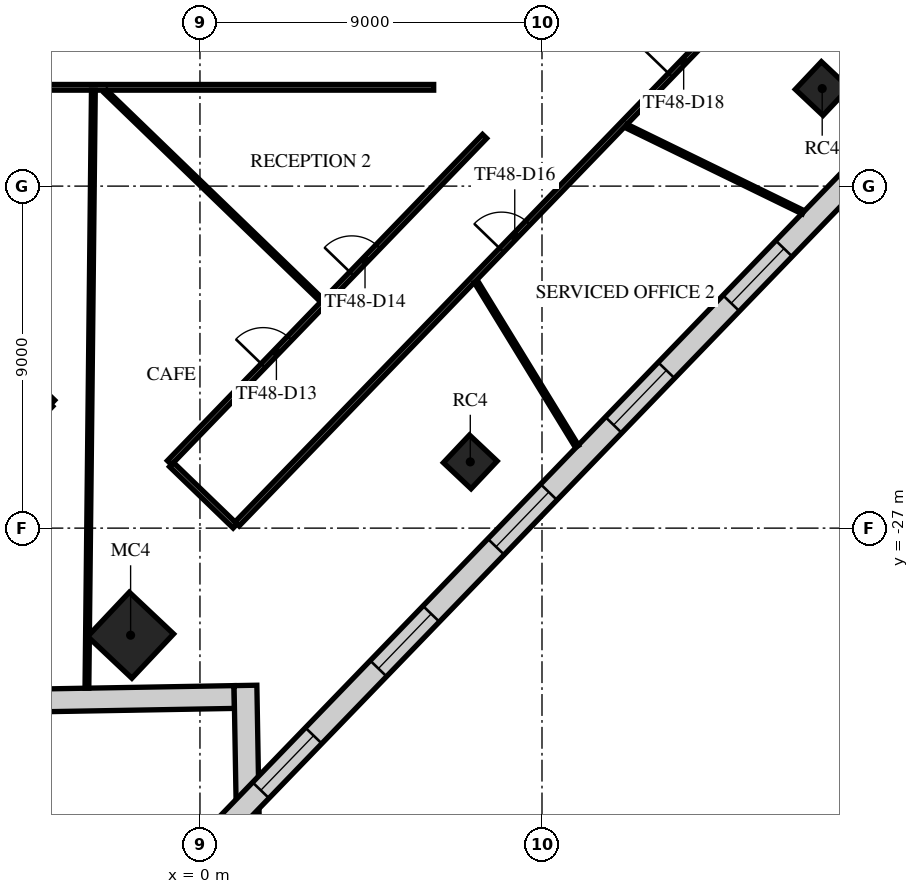
"""IFC4 building model, lengths in metres.
Left out: names, types, materials, properties, quantities, classifications, styles, units other than length and angle.
Written with IfcOpenShell. Run it as: python <this file> out.ifc"""

import sys

from ifc_helpers import new_model, si_unit, direction, frame, frame_2d, origin, origin_2d, place, context, subcontext, project, spatial, rectangle, extrude, element, fill, save


model = new_model("IFC4")
c1 = context("Model", 3, precision=1e-05, world=origin(), true_north=direction((0.0, 1.0)))
c2 = subcontext(c1, "Body", "Model", "MODEL_VIEW")
j1 = project(units=[si_unit("LENGTHUNIT", "METRE"), si_unit("PLANEANGLEUNIT", "RADIAN")], contexts=[c1])
p1 = place(None, origin())
s1 = spatial("IfcSite", under=j1, at=p1, CompositionType="ELEMENT")
p2 = place(p1, origin())
s2 = spatial("IfcBuilding", under=s1, at=p2, CompositionType="ELEMENT")
p3 = place(p2, frame((0.0, 0.0, 205.3)))
s3 = spatial("IfcBuildingStorey", under=s2, at=p3, CompositionType="ELEMENT", Elevation=205.3)
p4 = place(p3, frame((-1.825, -29.818, 0.0), z_axis=(0.0, 0.0, 1.0), x_axis=(0.685916152371, 0.727680583715, 0.0)))
e1 = element("IfcColumn", 1, at=p4, inside=s3, PredefinedType="COLUMN", context=c2, shape_type="SweptSolid", body=[
    extrude(rectangle(XDim=1.6, YDim=1.6, at=origin_2d()), origin(), (0.0, 0.0, 1.0), 4.0),
])
for number, where, z_axis, x_axis in (
    (2, (7.113, -25.257, 0.0), (0.0, 0.0, 1.0), (0.686, 0.728, 0.0)),
    (3, (16.373, -15.433, 0.0), (0.0, 0.0, 1.0), (0.686, 0.728, 0.0)),
):
    element("IfcColumn", number, at=place(p3, frame(where, z_axis=z_axis, x_axis=x_axis)), inside=s3, PredefinedType="COLUMN", context=c2, shape_type="SweptSolid", body=[
        extrude(rectangle(XDim=1.0, YDim=1.0, at=origin_2d()), origin(), (0.0, 0.0, 1.0), 4.0),
    ])
p5 = place(p3, frame((-6.875, -31.58, 0.0), z_axis=(0.0, 0.0, 1.0), x_axis=(0.999847712186, 0.017451430795, 0.0)))
e4 = element("IfcWall", 4, at=p5, inside=s3, PredefinedType="STANDARD", context=c2, shape_type="SweptSolid", body=[
    extrude(rectangle(XDim=7.778, YDim=0.6, at=frame_2d((3.889, 0.0))), origin(), (0.0, 0.0, 1.0), 3.62),
])
p6 = place(p5, frame((1.244, 0.0, 0.9)))
e5 = element("IfcOpeningElement", 5, at=p6, cuts=e4, PredefinedType="OPENING", context=c2, shape_type="SweptSolid", body=[
    extrude(rectangle(XDim=1.4, YDim=2.1, at=frame_2d((0.7, 1.05))), frame((0.0, 0.31, 0.0), z_axis=(0.0, -1.0, 0.0), x_axis=(1.0, 0.0, 0.0)), (0.0, 0.0, 1.0), 0.62),
])
p7 = place(p3, frame((1.197, -31.139, 0.0), z_axis=(0.0, 0.0, 1.0), x_axis=(0.017454332947, -0.999847661527, 0.0)))
e6 = element("IfcWall", 6, at=p7, inside=s3, PredefinedType="STANDARD", context=c2, shape_type="SweptSolid", body=[
    extrude(rectangle(XDim=3.846, YDim=0.6, at=frame_2d((1.923, 0.0))), origin(), (0.0, 0.0, 1.0), 3.62),
])
p8 = place(p3, frame((0.749, -34.782, 0.0), z_axis=(0.0, 0.0, 1.0), x_axis=(0.694657553534, 0.719340589233, 0.0)))
e7 = element("IfcWall", 7, at=p8, inside=s3, PredefinedType="STANDARD", context=c2, shape_type="SweptSolid", body=[
    extrude(rectangle(XDim=49.0, YDim=0.6, at=frame_2d((24.5, 0.0))), origin(), (0.0, 0.0, 1.0), 3.62),
])
p9 = place(p8, frame((1.227, 0.0, 0.9)))
e8 = element("IfcOpeningElement", 8, at=p9, cuts=e7, PredefinedType="OPENING", context=c2, shape_type="SweptSolid", body=[
    extrude(rectangle(XDim=2.0, YDim=2.1, at=frame_2d((1.0, 1.05))), frame((0.0, 0.31, 0.0), z_axis=(0.0, -1.0, 0.0), x_axis=(1.0, 0.0, 0.0)), (0.0, 0.0, 1.0), 0.62),
])
p10 = place(p8, frame((5.682, 0.0, 0.9)))
e9 = element("IfcOpeningElement", 9, at=p10, cuts=e7, PredefinedType="OPENING", context=c2, shape_type="SweptSolid", body=[
    extrude(rectangle(XDim=2.0, YDim=2.1, at=frame_2d((1.0, 1.05))), frame((0.0, 0.31, 0.0), z_axis=(0.0, -1.0, 0.0), x_axis=(1.0, 0.0, 0.0)), (0.0, 0.0, 1.0), 0.62),
])
p11 = place(p8, frame((10.136, 0.0, 0.9)))
e10 = element("IfcOpeningElement", 10, at=p11, cuts=e7, PredefinedType="OPENING", context=c2, shape_type="SweptSolid", body=[
    extrude(rectangle(XDim=2.0, YDim=2.1, at=frame_2d((1.0, 1.05))), frame((0.0, 0.31, 0.0), z_axis=(0.0, -1.0, 0.0), x_axis=(1.0, 0.0, 0.0)), (0.0, 0.0, 1.0), 0.62),
])
p12 = place(p8, frame((14.591, 0.0, 0.9)))
e11 = element("IfcOpeningElement", 11, at=p12, cuts=e7, PredefinedType="OPENING", context=c2, shape_type="SweptSolid", body=[
    extrude(rectangle(XDim=2.0, YDim=2.1, at=frame_2d((1.0, 1.05))), frame((0.0, 0.31, 0.0), z_axis=(0.0, -1.0, 0.0), x_axis=(1.0, 0.0, 0.0)), (0.0, 0.0, 1.0), 0.62),
])
p13 = place(p8, frame((19.045, 0.0, 0.9)))
e12 = element("IfcOpeningElement", 12, at=p13, cuts=e7, PredefinedType="OPENING", context=c2, shape_type="SweptSolid", body=[
    extrude(rectangle(XDim=2.0, YDim=2.1, at=frame_2d((1.0, 1.05))), frame((0.0, 0.31, 0.0), z_axis=(0.0, -1.0, 0.0), x_axis=(1.0, 0.0, 0.0)), (0.0, 0.0, 1.0), 0.62),
])
p14 = place(p8, frame((23.5, 0.0, 0.9)))
e13 = element("IfcOpeningElement", 13, at=p14, cuts=e7, PredefinedType="OPENING", context=c2, shape_type="SweptSolid", body=[
    extrude(rectangle(XDim=2.0, YDim=2.1, at=frame_2d((1.0, 1.05))), frame((0.0, 0.31, 0.0), z_axis=(0.0, -1.0, 0.0), x_axis=(1.0, 0.0, 0.0)), (0.0, 0.0, 1.0), 0.62),
])
p15 = place(p8, frame((27.955, 0.0, 0.9)))
e14 = element("IfcOpeningElement", 14, at=p15, cuts=e7, PredefinedType="OPENING", context=c2, shape_type="SweptSolid", body=[
    extrude(rectangle(XDim=2.0, YDim=2.1, at=frame_2d((1.0, 1.05))), frame((0.0, 0.31, 0.0), z_axis=(0.0, -1.0, 0.0), x_axis=(1.0, 0.0, 0.0)), (0.0, 0.0, 1.0), 0.62),
])
p16 = place(p8, frame((32.409, 0.0, 0.9)))
e15 = element("IfcOpeningElement", 15, at=p16, cuts=e7, PredefinedType="OPENING", context=c2, shape_type="SweptSolid", body=[
    extrude(rectangle(XDim=2.0, YDim=2.1, at=frame_2d((1.0, 1.05))), frame((0.0, 0.31, 0.0), z_axis=(0.0, -1.0, 0.0), x_axis=(1.0, 0.0, 0.0)), (0.0, 0.0, 1.0), 0.62),
])
p17 = place(p8, frame((36.864, 0.0, 0.9)))
e16 = element("IfcOpeningElement", 16, at=p17, cuts=e7, PredefinedType="OPENING", context=c2, shape_type="SweptSolid", body=[
    extrude(rectangle(XDim=2.0, YDim=2.1, at=frame_2d((1.0, 1.05))), frame((0.0, 0.31, 0.0), z_axis=(0.0, -1.0, 0.0), x_axis=(1.0, 0.0, 0.0)), (0.0, 0.0, 1.0), 0.62),
])
p18 = place(p8, frame((41.318, 0.0, 0.9)))
e17 = element("IfcOpeningElement", 17, at=p18, cuts=e7, PredefinedType="OPENING", context=c2, shape_type="SweptSolid", body=[
    extrude(rectangle(XDim=2.0, YDim=2.1, at=frame_2d((1.0, 1.05))), frame((0.0, 0.31, 0.0), z_axis=(0.0, -1.0, 0.0), x_axis=(1.0, 0.0, 0.0)), (0.0, 0.0, 1.0), 0.62),
])
p19 = place(p8, frame((45.773, 0.0, 0.9)))
e18 = element("IfcOpeningElement", 18, at=p19, cuts=e7, PredefinedType="OPENING", context=c2, shape_type="SweptSolid", body=[
    extrude(rectangle(XDim=2.0, YDim=2.1, at=frame_2d((1.0, 1.05))), frame((0.0, 0.31, 0.0), z_axis=(0.0, -1.0, 0.0), x_axis=(1.0, 0.0, 0.0)), (0.0, 0.0, 1.0), 0.62),
])
p20 = place(p3, frame((-12.459, -15.4, 0.0), z_axis=(0.0, 0.0, 1.0), x_axis=(0.719357740032, -0.694639792883, 0.0)))
e19 = element("IfcWall", 19, at=p20, inside=s3, PredefinedType="PARTITIONING", context=c2, shape_type="SweptSolid", body=[
    extrude(rectangle(XDim=11.931, YDim=0.15, at=frame_2d((5.966, 0.0))), origin(), (0.0, 0.0, 1.0), 3.17),
])
p21 = place(p3, frame((-12.273, -15.4, 0.0), z_axis=(0.0, 0.0, 1.0), x_axis=(1.0, 0.0, 0.0)))
e20 = element("IfcWall", 20, at=p21, inside=s3, PredefinedType="PARTITIONING", context=c2, shape_type="SweptSolid", body=[
    extrude(rectangle(XDim=18.423, YDim=0.15, at=frame_2d((9.212, 0.0))), origin(), (0.0, 0.0, 1.0), 3.17),
])
p22 = place(p21, frame((6.55, 0.0, 0.0)))
e21 = element("IfcOpeningElement", 21, at=p22, cuts=e20, PredefinedType="OPENING", context=c2, shape_type="SweptSolid", body=[
    extrude(rectangle(XDim=1.0, YDim=2.1, at=frame_2d((0.5, 1.05))), frame((0.0, 0.085, 0.0), z_axis=(0.0, -1.0, 0.0), x_axis=(1.0, 0.0, 0.0)), (0.0, 0.0, 1.0), 0.17),
])
p23 = place(p3, frame((-5.491, -25.36, 0.0), z_axis=(0.0, 0.0, 1.0), x_axis=(0.694737811608, 0.719263076435, 0.0)))
e22 = element("IfcWall", 22, at=p23, inside=s3, PredefinedType="PARTITIONING", context=c2, shape_type="SweptSolid", body=[
    extrude(rectangle(XDim=2.25, YDim=0.15, at=frame_2d((1.125, 0.0))), origin(), (0.0, 0.0, 1.0), 3.17),
])
p24 = place(p3, frame((-0.802, -25.277, 0.0), z_axis=(0.0, 0.0, 1.0), x_axis=(0.69467482151, 0.71932391338, 0.0)))
e23 = element("IfcWall", 23, at=p24, inside=s3, PredefinedType="PARTITIONING", context=c2, shape_type="SweptSolid", body=[
    extrude(rectangle(XDim=11.935, YDim=0.15, at=frame_2d((5.968, 0.0))), origin(), (0.0, 0.0, 1.0), 3.17),
])
p25 = place(p24, frame((3.55, 0.0, 0.0)))
e24 = element("IfcOpeningElement", 24, at=p25, cuts=e23, PredefinedType="OPENING", context=c2, shape_type="SweptSolid", body=[
    extrude(rectangle(XDim=1.0, YDim=2.1, at=frame_2d((0.5, 1.05))), frame((0.0, 0.085, 0.0), z_axis=(0.0, -1.0, 0.0), x_axis=(1.0, 0.0, 0.0)), (0.0, 0.0, 1.0), 0.17),
])
p26 = place(p24, frame((6.906, 0.0, 0.0)))
e25 = element("IfcOpeningElement", 25, at=p26, cuts=e23, PredefinedType="OPENING", context=c2, shape_type="SweptSolid", body=[
    extrude(rectangle(XDim=1.0, YDim=2.1, at=frame_2d((0.5, 1.05))), frame((0.0, 0.085, 0.0), z_axis=(0.0, -1.0, 0.0), x_axis=(1.0, 0.0, 0.0)), (0.0, 0.0, 1.0), 0.17),
])
p27 = place(p3, frame((-0.748, -25.329, 0.0), z_axis=(0.0, 0.0, 1.0), x_axis=(0.719490097839, -0.69450269914, 0.0)))
e26 = element("IfcWall", 26, at=p27, inside=s3, PredefinedType="PARTITIONING", context=c2, shape_type="SweptSolid", body=[
    extrude(rectangle(XDim=2.325, YDim=0.15, at=frame_2d((1.163, 0.0))), origin(), (0.0, 0.0, 1.0), 3.62),
])
p28 = place(p3, frame((0.977, -26.89, 0.0), z_axis=(0.0, 0.0, 1.0), x_axis=(0.694659509326, 0.719338700546, 0.0)))
e27 = element("IfcWall", 27, at=p28, inside=s3, PredefinedType="PARTITIONING", context=c2, shape_type="SweptSolid", body=[
    extrude(rectangle(XDim=37.404, YDim=0.15, at=frame_2d((18.702, 0.0))), origin(), (0.0, 0.0, 1.0), 3.17),
])
p29 = place(p28, frame((10.017, 0.0, 0.0)))
e28 = element("IfcOpeningElement", 28, at=p29, cuts=e27, PredefinedType="OPENING", context=c2, shape_type="SweptSolid", body=[
    extrude(rectangle(XDim=1.0, YDim=2.1, at=frame_2d((0.5, 1.05))), frame((0.0, 0.085, 0.0), z_axis=(0.0, -1.0, 0.0), x_axis=(1.0, 0.0, 0.0)), (0.0, 0.0, 1.0), 0.17),
])
p30 = place(p28, frame((16.416, 0.0, 0.0)))
e29 = element("IfcOpeningElement", 29, at=p30, cuts=e27, PredefinedType="OPENING", context=c2, shape_type="SweptSolid", body=[
    extrude(rectangle(XDim=1.0, YDim=2.1, at=frame_2d((0.5, 1.05))), frame((0.0, 0.085, 0.0), z_axis=(0.0, -1.0, 0.0), x_axis=(1.0, 0.0, 0.0)), (0.0, 0.0, 1.0), 0.17),
])
p31 = place(p28, frame((25.838, 0.0, 0.0)))
e30 = element("IfcOpeningElement", 30, at=p31, cuts=e27, PredefinedType="OPENING", context=c2, shape_type="SweptSolid", body=[
    extrude(rectangle(XDim=1.0, YDim=2.1, at=frame_2d((0.5, 1.05))), frame((0.0, 0.085, 0.0), z_axis=(0.0, -1.0, 0.0), x_axis=(1.0, 0.0, 0.0)), (0.0, 0.0, 1.0), 0.17),
])
p32 = place(p28, frame((31.566, 0.0, 0.0)))
e31 = element("IfcOpeningElement", 31, at=p32, cuts=e27, PredefinedType="OPENING", context=c2, shape_type="SweptSolid", body=[
    extrude(rectangle(XDim=1.0, YDim=2.1, at=frame_2d((0.5, 1.05))), frame((0.0, 0.085, 0.0), z_axis=(0.0, -1.0, 0.0), x_axis=(1.0, 0.0, 0.0)), (0.0, 0.0, 1.0), 0.17),
])
p33 = place(p3, frame((-2.975, -31.21, 0.0), z_axis=(0.0, 0.0, 1.0), x_axis=(0.010798774474, 0.999941691535, 0.0)))
e32 = element("IfcWall", 32, at=p33, inside=s3, PredefinedType="PARTITIONING", context=c2, shape_type="SweptSolid", body=[
    extrude(rectangle(XDim=15.735, YDim=0.1, at=frame_2d((7.868, 0.0))), origin(), (0.0, 0.0, 1.0), 2.97),
])
p34 = place(p3, frame((-2.484, -15.511, 0.0), z_axis=(0.0, 0.0, 1.0), x_axis=(0.719269714203, -0.694730939451, 0.0)))
e33 = element("IfcWall", 33, at=p34, inside=s3, PredefinedType="PARTITIONING", context=c2, shape_type="SweptSolid", body=[
    extrude(rectangle(XDim=7.919, YDim=0.1, at=frame_2d((3.96, 0.0))), origin(), (0.0, 0.0, 1.0), 3.17),
])
p35 = place(p3, frame((7.26, -20.509, 0.0), z_axis=(0.0, 0.0, 1.0), x_axis=(0.522477715675, -0.852652940312, 0.0)))
e34 = element("IfcWall", 34, at=p35, inside=s3, PredefinedType="PARTITIONING", context=c2, shape_type="SweptSolid", body=[
    extrude(rectangle(XDim=5.091, YDim=0.1, at=frame_2d((2.545, 0.0))), origin(), (0.0, 0.0, 1.0), 2.97),
])
p36 = place(p3, frame((11.216, -16.418, 0.0), z_axis=(0.0, 0.0, 1.0), x_axis=(0.898851336675, -0.438253664625, 0.0)))
e35 = element("IfcWall", 35, at=p36, inside=s3, PredefinedType="PARTITIONING", context=c2, shape_type="SweptSolid", body=[
    extrude(rectangle(XDim=5.179, YDim=0.1, at=frame_2d((2.59, 0.0))), origin(), (0.0, 0.0, 1.0), 2.97),
])
p37 = place(p9, origin())
e36 = element("IfcWindow", 36, at=p37, inside=s3, PartitioningType="SINGLE_PANEL", PredefinedType="WINDOW", context=c2, shape_type="SweptSolid", body=[
    extrude(rectangle(XDim=2.0, YDim=2.1, at=frame_2d((1.0, 1.05))), frame((0.0, 0.03, 0.0), z_axis=(0.0, -1.0, 0.0), x_axis=(1.0, 0.0, 0.0)), (0.0, 0.0, 1.0), 0.06),
])
fill(e8, e36)
p38 = place(p10, origin())
e37 = element("IfcWindow", 37, at=p38, inside=s3, PartitioningType="SINGLE_PANEL", PredefinedType="WINDOW", context=c2, shape_type="SweptSolid", body=[
    extrude(rectangle(XDim=2.0, YDim=2.1, at=frame_2d((1.0, 1.05))), frame((0.0, 0.03, 0.0), z_axis=(0.0, -1.0, 0.0), x_axis=(1.0, 0.0, 0.0)), (0.0, 0.0, 1.0), 0.06),
])
fill(e9, e37)
p39 = place(p11, origin())
e38 = element("IfcWindow", 38, at=p39, inside=s3, PartitioningType="SINGLE_PANEL", PredefinedType="WINDOW", context=c2, shape_type="SweptSolid", body=[
    extrude(rectangle(XDim=2.0, YDim=2.1, at=frame_2d((1.0, 1.05))), frame((0.0, 0.03, 0.0), z_axis=(0.0, -1.0, 0.0), x_axis=(1.0, 0.0, 0.0)), (0.0, 0.0, 1.0), 0.06),
])
fill(e10, e38)
p40 = place(p12, origin())
e39 = element("IfcWindow", 39, at=p40, inside=s3, PartitioningType="SINGLE_PANEL", PredefinedType="WINDOW", context=c2, shape_type="SweptSolid", body=[
    extrude(rectangle(XDim=2.0, YDim=2.1, at=frame_2d((1.0, 1.05))), frame((0.0, 0.03, 0.0), z_axis=(0.0, -1.0, 0.0), x_axis=(1.0, 0.0, 0.0)), (0.0, 0.0, 1.0), 0.06),
])
fill(e11, e39)
p41 = place(p13, origin())
e40 = element("IfcWindow", 40, at=p41, inside=s3, PartitioningType="SINGLE_PANEL", PredefinedType="WINDOW", context=c2, shape_type="SweptSolid", body=[
    extrude(rectangle(XDim=2.0, YDim=2.1, at=frame_2d((1.0, 1.05))), frame((0.0, 0.03, 0.0), z_axis=(0.0, -1.0, 0.0), x_axis=(1.0, 0.0, 0.0)), (0.0, 0.0, 1.0), 0.06),
])
fill(e12, e40)
p42 = place(p25, origin())
e41 = element("IfcDoor", 41, at=p42, inside=s3, OperationType="SINGLE_SWING_RIGHT", PredefinedType="DOOR", context=c2, shape_type="SweptSolid", body=[
    extrude(rectangle(XDim=1.0, YDim=2.1, at=frame_2d((0.5, 1.05))), frame((0.0, 0.025, 0.0), z_axis=(0.0, -1.0, 0.0), x_axis=(1.0, 0.0, 0.0)), (0.0, 0.0, 1.0), 0.05),
])
fill(e24, e41)
p43 = place(p26, origin())
e42 = element("IfcDoor", 42, at=p43, inside=s3, OperationType="SINGLE_SWING_RIGHT", PredefinedType="DOOR", context=c2, shape_type="SweptSolid", body=[
    extrude(rectangle(XDim=1.0, YDim=2.1, at=frame_2d((0.5, 1.05))), frame((0.0, 0.025, 0.0), z_axis=(0.0, -1.0, 0.0), x_axis=(1.0, 0.0, 0.0)), (0.0, 0.0, 1.0), 0.05),
])
fill(e25, e42)
p44 = place(p29, frame((1.0, 0.0, 0.0), z_axis=(0.0, 0.0, 1.0), x_axis=(-1.0, 0.0, 0.0)))
e43 = element("IfcDoor", 43, at=p44, inside=s3, OperationType="SINGLE_SWING_LEFT", PredefinedType="DOOR", context=c2, shape_type="SweptSolid", body=[
    extrude(rectangle(XDim=1.0, YDim=2.1, at=frame_2d((0.5, 1.05))), frame((0.0, 0.025, 0.0), z_axis=(0.0, -1.0, 0.0), x_axis=(1.0, 0.0, 0.0)), (0.0, 0.0, 1.0), 0.05),
])
fill(e28, e43)
p45 = place(p30, frame((1.0, 0.0, 0.0), z_axis=(0.0, 0.0, 1.0), x_axis=(-1.0, 0.0, 0.0)))
e44 = element("IfcDoor", 44, at=p45, inside=s3, OperationType="SINGLE_SWING_RIGHT", PredefinedType="DOOR", context=c2, shape_type="SweptSolid", body=[
    extrude(rectangle(XDim=1.0, YDim=2.1, at=frame_2d((0.5, 1.05))), frame((0.0, 0.025, 0.0), z_axis=(0.0, -1.0, 0.0), x_axis=(1.0, 0.0, 0.0)), (0.0, 0.0, 1.0), 0.05),
])
fill(e29, e44)
save(model, sys.argv[1])
